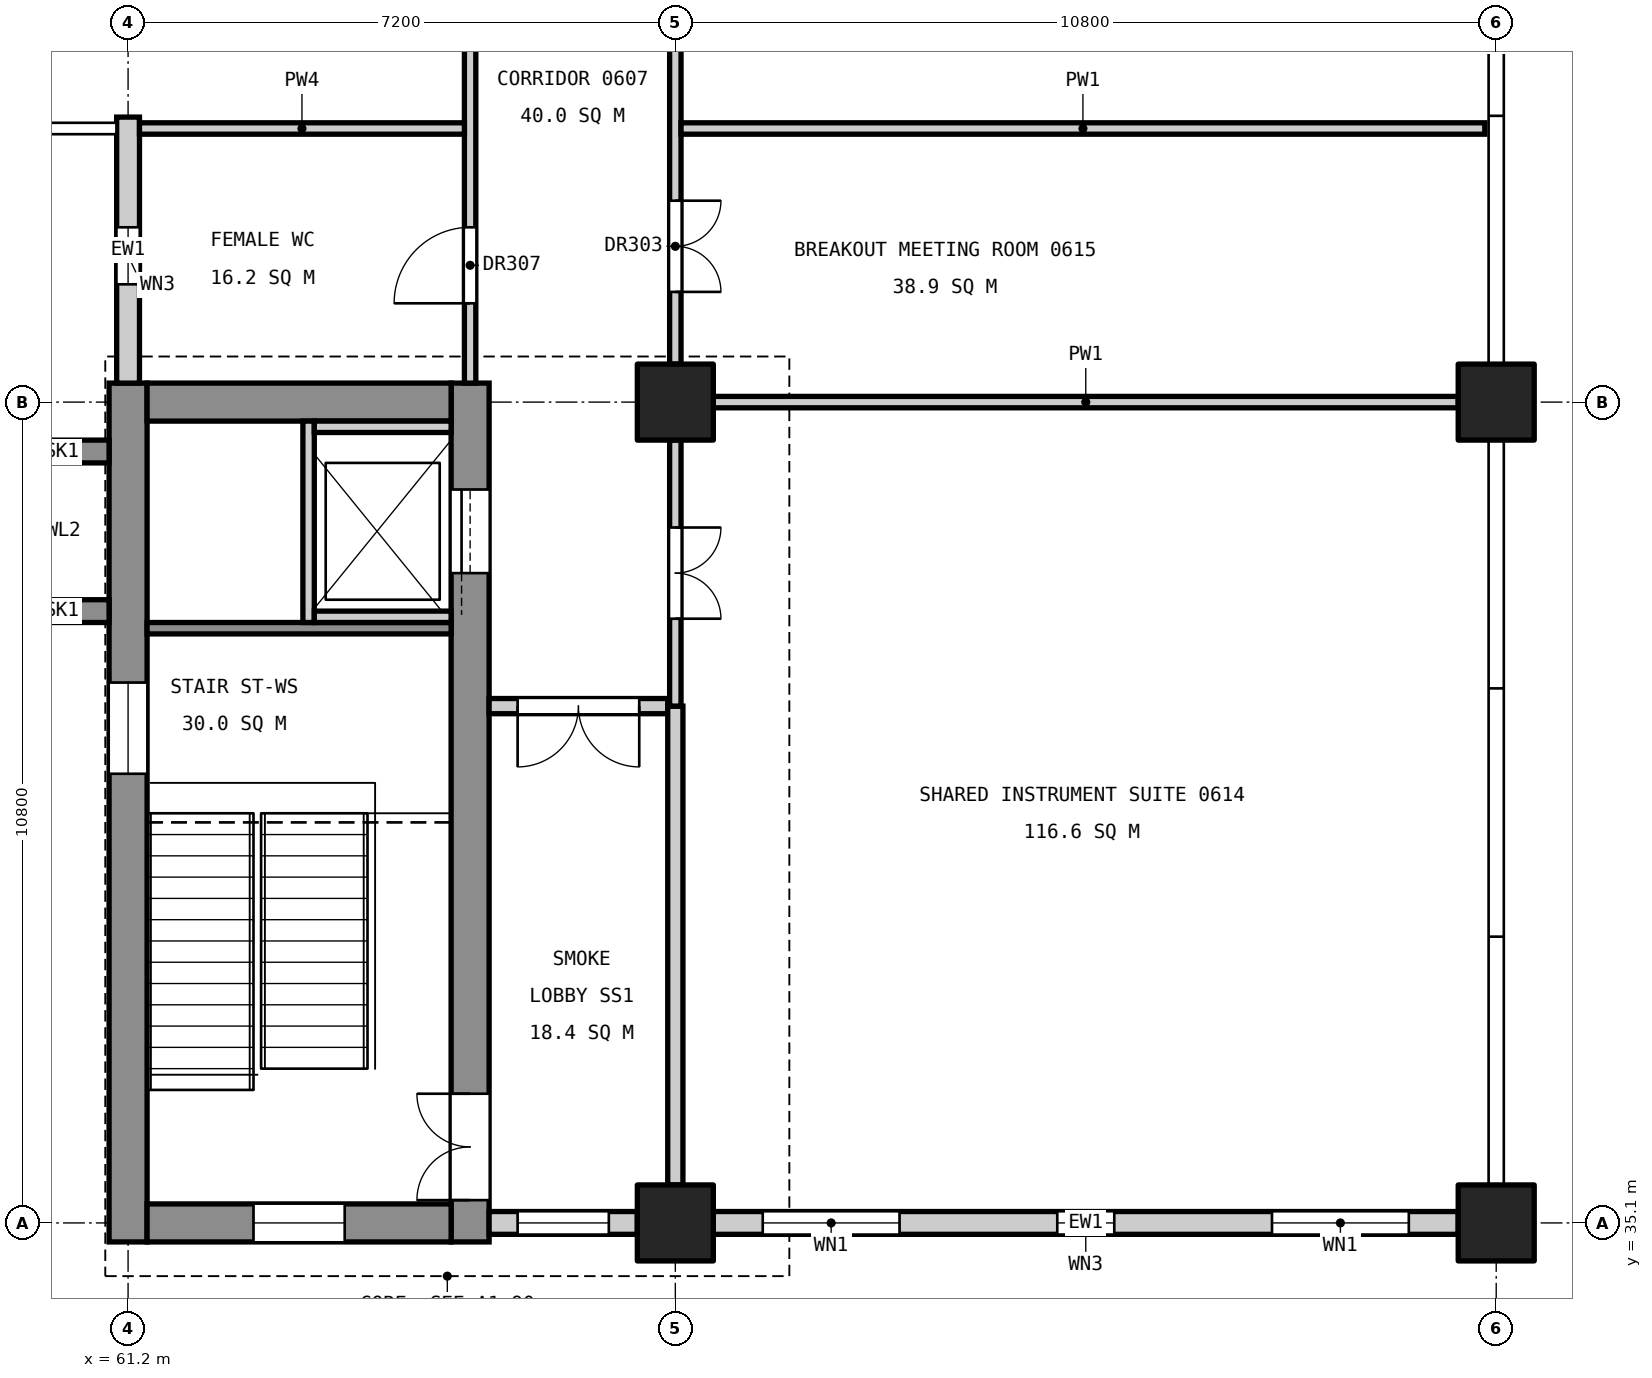
"""IFC4 building model, lengths in metres.
Left out: names, types, materials, properties, quantities, classifications, styles, units other than length and angle.
Written with IfcOpenShell. Run it as: python <this file> out.ifc"""

import sys

from ifc_helpers import new_model, si_unit, direction, frame, frame_2d, origin, origin_2d, place, context, subcontext, project, spatial, rectangle, extrude, element, fill, save


model = new_model("IFC4")
c1 = context("Model", 3, precision=1e-05, world=origin(), true_north=direction((0.0, 1.0)))
c2 = subcontext(c1, "Body", "Model", "MODEL_VIEW")
j1 = project(units=[si_unit("LENGTHUNIT", "METRE"), si_unit("PLANEANGLEUNIT", "RADIAN")], contexts=[c1])
p1 = place(None, origin())
s1 = spatial("IfcSite", under=j1, at=p1, CompositionType="ELEMENT")
p2 = place(p1, origin())
s2 = spatial("IfcBuilding", under=s1, at=p2, CompositionType="ELEMENT")
p3 = place(p2, frame((0.0, 0.0, 31.8)))
s3 = spatial("IfcBuildingStorey", under=s2, at=p3, CompositionType="ELEMENT", Elevation=31.8)
for number, where, z_axis, x_axis in (
    (1, (68.4, 35.1, 0.0), (0.0, 0.0, 1.0), (1.0, 0.0, 0.0)),
    (2, (68.4, 45.9, 0.0), (0.0, 0.0, 1.0), (1.0, 0.0, 0.0)),
    (3, (79.2, 35.1, 0.0), (0.0, 0.0, 1.0), (1.0, 0.0, 0.0)),
    (4, (79.2, 45.9, 0.0), (0.0, 0.0, 1.0), (1.0, 0.0, 0.0)),
):
    element("IfcColumn", number, at=place(p3, frame(where, z_axis=z_axis, x_axis=x_axis)), inside=s3, PredefinedType="COLUMN", context=c2, shape_type="SweptSolid", body=[
        extrude(rectangle(XDim=1.0, YDim=1.0, at=origin_2d()), origin(), (0.0, 0.0, 1.0), 4.8),
    ])
p4 = place(p3, frame((61.2, 34.85, 0.0), z_axis=(0.0, 0.0, 1.0), x_axis=(0.0, 1.0, 0.0)))
e5 = element("IfcWall", 5, at=p4, inside=s3, PredefinedType="SHEAR", context=c2, shape_type="SweptSolid", body=[
    extrude(rectangle(XDim=11.3, YDim=0.5, at=frame_2d((5.65, 0.0))), origin(), (0.0, 0.0, 1.0), 4.55),
])
p5 = place(p4, frame((6.16, 0.0, 3.4)))
e6 = element("IfcOpeningElement", 6, at=p5, cuts=e5, PredefinedType="OPENING", context=c2, shape_type="SweptSolid", body=[
    extrude(rectangle(XDim=1.2, YDim=0.9, at=frame_2d((0.6, 0.45))), frame((0.0, 0.26, 0.0), z_axis=(0.0, -1.0, 0.0), x_axis=(1.0, 0.0, 0.0)), (0.0, 0.0, 1.0), 0.52),
])
p6 = place(p3, frame((65.7, 34.85, 0.0), z_axis=(0.0, 0.0, 1.0), x_axis=(0.0, 1.0, 0.0)))
e7 = element("IfcWall", 7, at=p6, inside=s3, PredefinedType="SHEAR", context=c2, shape_type="SweptSolid", body=[
    extrude(rectangle(XDim=11.3, YDim=0.5, at=frame_2d((5.65, 0.0))), origin(), (0.0, 0.0, 1.0), 4.55),
])
p7 = place(p6, frame((0.55, 0.0, 0.0)))
e8 = element("IfcOpeningElement", 8, at=p7, cuts=e7, PredefinedType="OPENING", context=c2, shape_type="SweptSolid", body=[
    extrude(rectangle(XDim=1.4, YDim=2.1, at=frame_2d((0.7, 1.05))), frame((0.0, 0.26, 0.0), z_axis=(0.0, -1.0, 0.0), x_axis=(1.0, 0.0, 0.0)), (0.0, 0.0, 1.0), 0.52),
])
p8 = place(p6, frame((8.8, 0.0, 0.0)))
e9 = element("IfcOpeningElement", 9, at=p8, cuts=e7, PredefinedType="OPENING", context=c2, shape_type="SweptSolid", body=[
    extrude(rectangle(XDim=1.1, YDim=2.1, at=frame_2d((0.55, 1.05))), frame((0.0, 0.26, 0.0), z_axis=(0.0, -1.0, 0.0), x_axis=(1.0, 0.0, 0.0)), (0.0, 0.0, 1.0), 0.52),
])
p9 = place(p3, frame((61.45, 35.1, 0.0), z_axis=(0.0, 0.0, 1.0), x_axis=(1.0, 0.0, 0.0)))
e10 = element("IfcWall", 10, at=p9, inside=s3, PredefinedType="SHEAR", context=c2, shape_type="SweptSolid", body=[
    extrude(rectangle(XDim=4.0, YDim=0.5, at=frame_2d((2.0, 0.0))), origin(), (0.0, 0.0, 1.0), 4.55),
])
p10 = place(p9, frame((1.4, 0.0, 3.4)))
e11 = element("IfcOpeningElement", 11, at=p10, cuts=e10, PredefinedType="OPENING", context=c2, shape_type="SweptSolid", body=[
    extrude(rectangle(XDim=1.2, YDim=0.9, at=frame_2d((0.6, 0.45))), frame((0.0, 0.26, 0.0), z_axis=(0.0, -1.0, 0.0), x_axis=(1.0, 0.0, 0.0)), (0.0, 0.0, 1.0), 0.52),
])
p11 = place(p3, frame((61.45, 45.9, 0.0), z_axis=(0.0, 0.0, 1.0), x_axis=(1.0, 0.0, 0.0)))
e12 = element("IfcWall", 12, at=p11, inside=s3, PredefinedType="SHEAR", context=c2, shape_type="SweptSolid", body=[
    extrude(rectangle(XDim=4.0, YDim=0.5, at=frame_2d((2.0, 0.0))), origin(), (0.0, 0.0, 1.0), 4.55),
])
for number, where, z_axis, x_axis in (
    (13, (60.95, 43.15, 0.0), (0.0, 0.0, 1.0), (-1.0, 0.0, 0.0)),
    (14, (60.95, 45.25, 0.0), (0.0, 0.0, 1.0), (-1.0, 0.0, 0.0)),
):
    element("IfcWall", number, at=place(p3, frame(where, z_axis=z_axis, x_axis=x_axis)), inside=s3, PredefinedType="SHEAR", context=c2, shape_type="SweptSolid", body=[
        extrude(rectangle(XDim=1.25, YDim=0.3, at=frame_2d((0.625, 0.0))), origin(), (0.0, 0.0, 1.0), 4.8),
    ])
p12 = place(p3, frame((61.45, 42.925, 0.0), z_axis=(0.0, 0.0, 1.0), x_axis=(1.0, 0.0, 0.0)))
e15 = element("IfcWall", 15, at=p12, inside=s3, PredefinedType="SOLIDWALL", context=c2, shape_type="SweptSolid", body=[
    extrude(rectangle(XDim=4.0, YDim=0.15, at=frame_2d((2.0, 0.0))), origin(), (0.0, 0.0, 1.0), 4.55),
])
p13 = place(p3, frame((63.575, 43.0, 0.0), z_axis=(0.0, 0.0, 1.0), x_axis=(0.0, 1.0, 0.0)))
e16 = element("IfcWall", 16, at=p13, inside=s3, PredefinedType="SOLIDWALL", context=c2, shape_type="SweptSolid", body=[
    extrude(rectangle(XDim=2.65, YDim=0.15, at=frame_2d((1.325, 0.0))), origin(), (0.0, 0.0, 1.0), 4.8),
])
for number, where, z_axis, x_axis in (
    (17, (63.65, 43.075, 0.0), (0.0, 0.0, 1.0), (1.0, 0.0, 0.0)),
    (18, (63.65, 45.575, 0.0), (0.0, 0.0, 1.0), (1.0, 0.0, 0.0)),
):
    element("IfcWall", number, at=place(p3, frame(where, z_axis=z_axis, x_axis=x_axis)), inside=s3, PredefinedType="SOLIDWALL", context=c2, shape_type="SweptSolid", body=[
        extrude(rectangle(XDim=1.8, YDim=0.15, at=frame_2d((0.9, 0.0))), origin(), (0.0, 0.0, 1.0), 4.8),
    ])
p14 = place(p3, frame((61.2, 46.15, 0.0), z_axis=(0.0, 0.0, 1.0), x_axis=(0.0, 1.0, 0.0)))
e19 = element("IfcWall", 19, at=p14, inside=s3, PredefinedType="STANDARD", context=c2, shape_type="SweptSolid", body=[
    extrude(rectangle(XDim=3.5, YDim=0.3, at=frame_2d((1.75, 0.0))), origin(), (0.0, 0.0, 1.0), 3.65),
])
p15 = place(p14, frame((1.3, 0.0, 0.8)))
e20 = element("IfcOpeningElement", 20, at=p15, cuts=e19, PredefinedType="OPENING", context=c2, shape_type="SweptSolid", body=[
    extrude(rectangle(XDim=0.75, YDim=1.2, at=frame_2d((0.375, 0.6))), frame((0.0, 0.16, 0.0), z_axis=(0.0, -1.0, 0.0), x_axis=(1.0, 0.0, 0.0)), (0.0, 0.0, 1.0), 0.32),
])
p16 = place(p3, frame((65.95, 35.1, 0.0), z_axis=(0.0, 0.0, 1.0), x_axis=(1.0, 0.0, 0.0)))
e21 = element("IfcWall", 21, at=p16, inside=s3, PredefinedType="STANDARD", context=c2, shape_type="SweptSolid", body=[
    extrude(rectangle(XDim=1.95, YDim=0.3, at=frame_2d((0.975, 0.0))), origin(), (0.0, 0.0, 1.0), 3.85),
])
p17 = place(p16, frame((0.375, 0.0, 0.9)))
e22 = element("IfcOpeningElement", 22, at=p17, cuts=e21, PredefinedType="OPENING", context=c2, shape_type="SweptSolid", body=[
    extrude(rectangle(XDim=1.2, YDim=2.4, at=frame_2d((0.6, 1.2))), frame((0.0, 0.16, 0.0), z_axis=(0.0, -1.0, 0.0), x_axis=(1.0, 0.0, 0.0)), (0.0, 0.0, 1.0), 0.32),
])
p18 = place(p3, frame((68.9, 35.1, 0.0), z_axis=(0.0, 0.0, 1.0), x_axis=(1.0, 0.0, 0.0)))
e23 = element("IfcWall", 23, at=p18, inside=s3, PredefinedType="STANDARD", context=c2, shape_type="SweptSolid", body=[
    extrude(rectangle(XDim=9.8, YDim=0.3, at=frame_2d((4.9, 0.0))), origin(), (0.0, 0.0, 1.0), 3.85),
])
p19 = place(p18, frame((0.65, 0.0, 0.9)))
e24 = element("IfcOpeningElement", 24, at=p19, cuts=e23, PredefinedType="OPENING", context=c2, shape_type="SweptSolid", body=[
    extrude(rectangle(XDim=1.8, YDim=2.4, at=frame_2d((0.9, 1.2))), frame((0.0, 0.16, 0.0), z_axis=(0.0, -1.0, 0.0), x_axis=(1.0, 0.0, 0.0)), (0.0, 0.0, 1.0), 0.32),
])
p20 = place(p18, frame((4.525, 0.0, 0.8)))
e25 = element("IfcOpeningElement", 25, at=p20, cuts=e23, PredefinedType="OPENING", context=c2, shape_type="SweptSolid", body=[
    extrude(rectangle(XDim=0.75, YDim=1.2, at=frame_2d((0.375, 0.6))), frame((0.0, 0.16, 0.0), z_axis=(0.0, -1.0, 0.0), x_axis=(1.0, 0.0, 0.0)), (0.0, 0.0, 1.0), 0.32),
])
p21 = place(p18, frame((7.35, 0.0, 0.9)))
e26 = element("IfcOpeningElement", 26, at=p21, cuts=e23, PredefinedType="OPENING", context=c2, shape_type="SweptSolid", body=[
    extrude(rectangle(XDim=1.8, YDim=2.4, at=frame_2d((0.9, 1.2))), frame((0.0, 0.16, 0.0), z_axis=(0.0, -1.0, 0.0), x_axis=(1.0, 0.0, 0.0)), (0.0, 0.0, 1.0), 0.32),
])
p22 = place(p3, frame((65.7, 46.15, 0.0), z_axis=(0.0, 0.0, 1.0), x_axis=(0.0, 1.0, 0.0)))
e27 = element("IfcWall", 27, at=p22, inside=s3, PredefinedType="PARTITIONING", context=c2, shape_type="SweptSolid", body=[
    extrude(rectangle(XDim=10.4, YDim=0.15, at=frame_2d((5.2, 0.0))), origin(), (0.0, 0.0, 1.0), 3.55),
])
p23 = place(p22, frame((1.05, 0.0, 0.0)))
e28 = element("IfcOpeningElement", 28, at=p23, cuts=e27, PredefinedType="OPENING", context=c2, shape_type="SweptSolid", body=[
    extrude(rectangle(XDim=1.0, YDim=2.1, at=frame_2d((0.5, 1.05))), frame((0.0, 0.085, 0.0), z_axis=(0.0, -1.0, 0.0), x_axis=(1.0, 0.0, 0.0)), (0.0, 0.0, 1.0), 0.17),
])
p24 = place(p22, frame((6.45, 0.0, 0.0)))
e29 = element("IfcOpeningElement", 29, at=p24, cuts=e27, PredefinedType="OPENING", context=c2, shape_type="SweptSolid", body=[
    extrude(rectangle(XDim=1.0, YDim=2.1, at=frame_2d((0.5, 1.05))), frame((0.0, 0.085, 0.0), z_axis=(0.0, -1.0, 0.0), x_axis=(1.0, 0.0, 0.0)), (0.0, 0.0, 1.0), 0.17),
])
p25 = place(p3, frame((61.35, 49.5, 0.0), z_axis=(0.0, 0.0, 1.0), x_axis=(1.0, 0.0, 0.0)))
e30 = element("IfcWall", 30, at=p25, inside=s3, PredefinedType="PARTITIONING", context=c2, shape_type="SweptSolid", body=[
    extrude(rectangle(XDim=4.275, YDim=0.15, at=frame_2d((2.137, 0.0))), origin(), (0.0, 0.0, 1.0), 3.85),
])
p26 = place(p3, frame((65.95, 41.9, 0.0), z_axis=(0.0, 0.0, 1.0), x_axis=(1.0, 0.0, 0.0)))
e31 = element("IfcWall", 31, at=p26, inside=s3, PredefinedType="PARTITIONING", context=c2, shape_type="SweptSolid", body=[
    extrude(rectangle(XDim=2.35, YDim=0.2, at=frame_2d((1.175, 0.0))), origin(), (0.0, 0.0, 1.0), 3.55),
])
p27 = place(p26, frame((0.375, 0.0, 0.0)))
e32 = element("IfcOpeningElement", 32, at=p27, cuts=e31, PredefinedType="OPENING", context=c2, shape_type="SweptSolid", body=[
    extrude(rectangle(XDim=1.6, YDim=2.1, at=frame_2d((0.8, 1.05))), frame((0.0, 0.11, 0.0), z_axis=(0.0, -1.0, 0.0), x_axis=(1.0, 0.0, 0.0)), (0.0, 0.0, 1.0), 0.22),
])
p28 = place(p3, frame((68.4, 35.6, 0.0), z_axis=(0.0, 0.0, 1.0), x_axis=(0.0, 1.0, 0.0)))
e33 = element("IfcWall", 33, at=p28, inside=s3, PredefinedType="PARTITIONING", context=c2, shape_type="SweptSolid", body=[
    extrude(rectangle(XDim=6.3, YDim=0.2, at=frame_2d((3.15, 0.0))), origin(), (0.0, 0.0, 1.0), 3.55),
])
p29 = place(p3, frame((68.4, 41.9, 0.0), z_axis=(0.0, 0.0, 1.0), x_axis=(0.0, 1.0, 0.0)))
e34 = element("IfcWall", 34, at=p29, inside=s3, PredefinedType="PARTITIONING", context=c2, shape_type="SweptSolid", body=[
    extrude(rectangle(XDim=3.5, YDim=0.15, at=frame_2d((1.75, 0.0))), origin(), (0.0, 0.0, 1.0), 3.55),
])
p30 = place(p29, frame((1.15, 0.0, 0.0)))
e35 = element("IfcOpeningElement", 35, at=p30, cuts=e34, PredefinedType="OPENING", context=c2, shape_type="SweptSolid", body=[
    extrude(rectangle(XDim=1.2, YDim=2.1, at=frame_2d((0.6, 1.05))), frame((0.0, 0.085, 0.0), z_axis=(0.0, -1.0, 0.0), x_axis=(1.0, 0.0, 0.0)), (0.0, 0.0, 1.0), 0.17),
])
p31 = place(p3, frame((68.4, 46.4, 0.0), z_axis=(0.0, 0.0, 1.0), x_axis=(0.0, 1.0, 0.0)))
e36 = element("IfcWall", 36, at=p31, inside=s3, PredefinedType="PARTITIONING", context=c2, shape_type="SweptSolid", body=[
    extrude(rectangle(XDim=9.8, YDim=0.15, at=frame_2d((4.9, 0.0))), origin(), (0.0, 0.0, 1.0), 3.55),
])
p32 = place(p31, frame((0.95, 0.0, 0.0)))
e37 = element("IfcOpeningElement", 37, at=p32, cuts=e36, PredefinedType="OPENING", context=c2, shape_type="SweptSolid", body=[
    extrude(rectangle(XDim=1.2, YDim=2.1, at=frame_2d((0.6, 1.05))), frame((0.0, 0.085, 0.0), z_axis=(0.0, -1.0, 0.0), x_axis=(1.0, 0.0, 0.0)), (0.0, 0.0, 1.0), 0.17),
])
p33 = place(p31, frame((5.85, 0.0, 0.0)))
e38 = element("IfcOpeningElement", 38, at=p33, cuts=e36, PredefinedType="OPENING", context=c2, shape_type="SweptSolid", body=[
    extrude(rectangle(XDim=1.2, YDim=2.1, at=frame_2d((0.6, 1.05))), frame((0.0, 0.085, 0.0), z_axis=(0.0, -1.0, 0.0), x_axis=(1.0, 0.0, 0.0)), (0.0, 0.0, 1.0), 0.17),
])
p34 = place(p3, frame((68.9, 45.9, 0.0), z_axis=(0.0, 0.0, 1.0), x_axis=(1.0, 0.0, 0.0)))
e39 = element("IfcWall", 39, at=p34, inside=s3, PredefinedType="PARTITIONING", context=c2, shape_type="SweptSolid", body=[
    extrude(rectangle(XDim=9.8, YDim=0.15, at=frame_2d((4.9, 0.0))), origin(), (0.0, 0.0, 1.0), 3.85),
])
p35 = place(p3, frame((68.475, 49.5, 0.0), z_axis=(0.0, 0.0, 1.0), x_axis=(1.0, 0.0, 0.0)))
e40 = element("IfcWall", 40, at=p35, inside=s3, PredefinedType="PARTITIONING", context=c2, shape_type="SweptSolid", body=[
    extrude(rectangle(XDim=10.575, YDim=0.15, at=frame_2d((5.288, 0.0))), origin(), (0.0, 0.0, 1.0), 3.85),
])
p36 = place(p7, origin())
e41 = element("IfcDoor", 41, at=p36, inside=s3, OperationType="DOUBLE_DOOR_SINGLE_SWING", PredefinedType="DOOR", context=c2, shape_type="SweptSolid", body=[
    extrude(rectangle(XDim=1.4, YDim=2.1, at=frame_2d((0.7, 1.05))), frame((0.0, 0.025, 0.0), z_axis=(0.0, -1.0, 0.0), x_axis=(1.0, 0.0, 0.0)), (0.0, 0.0, 1.0), 0.05),
])
fill(e8, e41)
p37 = place(p8, origin())
e42 = element("IfcDoor", 42, at=p37, inside=s3, OperationType="SLIDING_TO_LEFT", PredefinedType="DOOR", context=c2, shape_type="SweptSolid", body=[
    extrude(rectangle(XDim=1.1, YDim=2.1, at=frame_2d((0.55, 1.05))), frame((0.0, 0.025, 0.0), z_axis=(0.0, -1.0, 0.0), x_axis=(1.0, 0.0, 0.0)), (0.0, 0.0, 1.0), 0.05),
])
fill(e9, e42)
p38 = place(p15, origin())
e43 = element("IfcWindow", 43, at=p38, inside=s3, PartitioningType="SINGLE_PANEL", PredefinedType="WINDOW", context=c2, shape_type="SweptSolid", body=[
    extrude(rectangle(XDim=0.75, YDim=1.2, at=frame_2d((0.375, 0.6))), frame((0.0, 0.03, 0.0), z_axis=(0.0, -1.0, 0.0), x_axis=(1.0, 0.0, 0.0)), (0.0, 0.0, 1.0), 0.06),
])
fill(e20, e43)
p39 = place(p17, origin())
e44 = element("IfcWindow", 44, at=p39, inside=s3, PartitioningType="SINGLE_PANEL", PredefinedType="WINDOW", context=c2, shape_type="SweptSolid", body=[
    extrude(rectangle(XDim=1.2, YDim=2.4, at=frame_2d((0.6, 1.2))), frame((0.0, 0.03, 0.0), z_axis=(0.0, -1.0, 0.0), x_axis=(1.0, 0.0, 0.0)), (0.0, 0.0, 1.0), 0.06),
])
fill(e22, e44)
p40 = place(p19, origin())
e45 = element("IfcWindow", 45, at=p40, inside=s3, PartitioningType="SINGLE_PANEL", PredefinedType="WINDOW", context=c2, shape_type="SweptSolid", body=[
    extrude(rectangle(XDim=1.8, YDim=2.4, at=frame_2d((0.9, 1.2))), frame((0.0, 0.03, 0.0), z_axis=(0.0, -1.0, 0.0), x_axis=(1.0, 0.0, 0.0)), (0.0, 0.0, 1.0), 0.06),
])
fill(e24, e45)
p41 = place(p20, origin())
e46 = element("IfcWindow", 46, at=p41, inside=s3, PartitioningType="SINGLE_PANEL", PredefinedType="WINDOW", context=c2, shape_type="SweptSolid", body=[
    extrude(rectangle(XDim=0.75, YDim=1.2, at=frame_2d((0.375, 0.6))), frame((0.0, 0.03, 0.0), z_axis=(0.0, -1.0, 0.0), x_axis=(1.0, 0.0, 0.0)), (0.0, 0.0, 1.0), 0.06),
])
fill(e25, e46)
p42 = place(p21, origin())
e47 = element("IfcWindow", 47, at=p42, inside=s3, PartitioningType="SINGLE_PANEL", PredefinedType="WINDOW", context=c2, shape_type="SweptSolid", body=[
    extrude(rectangle(XDim=1.8, YDim=2.4, at=frame_2d((0.9, 1.2))), frame((0.0, 0.03, 0.0), z_axis=(0.0, -1.0, 0.0), x_axis=(1.0, 0.0, 0.0)), (0.0, 0.0, 1.0), 0.06),
])
fill(e26, e47)
p43 = place(p5, origin())
e48 = element("IfcWindow", 48, at=p43, inside=s3, PartitioningType="SINGLE_PANEL", PredefinedType="WINDOW", context=c2, shape_type="SweptSolid", body=[
    extrude(rectangle(XDim=1.2, YDim=0.9, at=frame_2d((0.6, 0.45))), frame((0.0, 0.03, 0.0), z_axis=(0.0, -1.0, 0.0), x_axis=(1.0, 0.0, 0.0)), (0.0, 0.0, 1.0), 0.06),
])
fill(e6, e48)
p44 = place(p10, origin())
e49 = element("IfcWindow", 49, at=p44, inside=s3, PartitioningType="SINGLE_PANEL", PredefinedType="WINDOW", context=c2, shape_type="SweptSolid", body=[
    extrude(rectangle(XDim=1.2, YDim=0.9, at=frame_2d((0.6, 0.45))), frame((0.0, 0.03, 0.0), z_axis=(0.0, -1.0, 0.0), x_axis=(1.0, 0.0, 0.0)), (0.0, 0.0, 1.0), 0.06),
])
fill(e11, e49)
p45 = place(p32, frame((1.2, 0.0, 0.0), z_axis=(0.0, 0.0, 1.0), x_axis=(-1.0, 0.0, 0.0)))
e50 = element("IfcDoor", 50, at=p45, inside=s3, OperationType="DOUBLE_DOOR_SINGLE_SWING", PredefinedType="DOOR", context=c2, shape_type="SweptSolid", body=[
    extrude(rectangle(XDim=1.2, YDim=2.1, at=frame_2d((0.6, 1.05))), frame((0.0, 0.025, 0.0), z_axis=(0.0, -1.0, 0.0), x_axis=(1.0, 0.0, 0.0)), (0.0, 0.0, 1.0), 0.05),
])
fill(e37, e50)
p46 = place(p23, origin())
e51 = element("IfcDoor", 51, at=p46, inside=s3, OperationType="SINGLE_SWING_LEFT", PredefinedType="DOOR", context=c2, shape_type="SweptSolid", body=[
    extrude(rectangle(XDim=1.0, YDim=2.1, at=frame_2d((0.5, 1.05))), frame((0.0, 0.025, 0.0), z_axis=(0.0, -1.0, 0.0), x_axis=(1.0, 0.0, 0.0)), (0.0, 0.0, 1.0), 0.05),
])
fill(e28, e51)
p47 = place(p30, frame((1.2, 0.0, 0.0), z_axis=(0.0, 0.0, 1.0), x_axis=(-1.0, 0.0, 0.0)))
e52 = element("IfcDoor", 52, at=p47, inside=s3, OperationType="DOUBLE_DOOR_SINGLE_SWING", PredefinedType="DOOR", context=c2, shape_type="SweptSolid", body=[
    extrude(rectangle(XDim=1.2, YDim=2.1, at=frame_2d((0.6, 1.05))), frame((0.0, 0.025, 0.0), z_axis=(0.0, -1.0, 0.0), x_axis=(1.0, 0.0, 0.0)), (0.0, 0.0, 1.0), 0.05),
])
fill(e35, e52)
p48 = place(p27, frame((1.6, 0.0, 0.0), z_axis=(0.0, 0.0, 1.0), x_axis=(-1.0, 0.0, 0.0)))
e53 = element("IfcDoor", 53, at=p48, inside=s3, OperationType="DOUBLE_DOOR_SINGLE_SWING", PredefinedType="DOOR", context=c2, shape_type="SweptSolid", body=[
    extrude(rectangle(XDim=1.6, YDim=2.1, at=frame_2d((0.8, 1.05))), frame((0.0, 0.025, 0.0), z_axis=(0.0, -1.0, 0.0), x_axis=(1.0, 0.0, 0.0)), (0.0, 0.0, 1.0), 0.05),
])
fill(e32, e53)
save(model, sys.argv[1])
